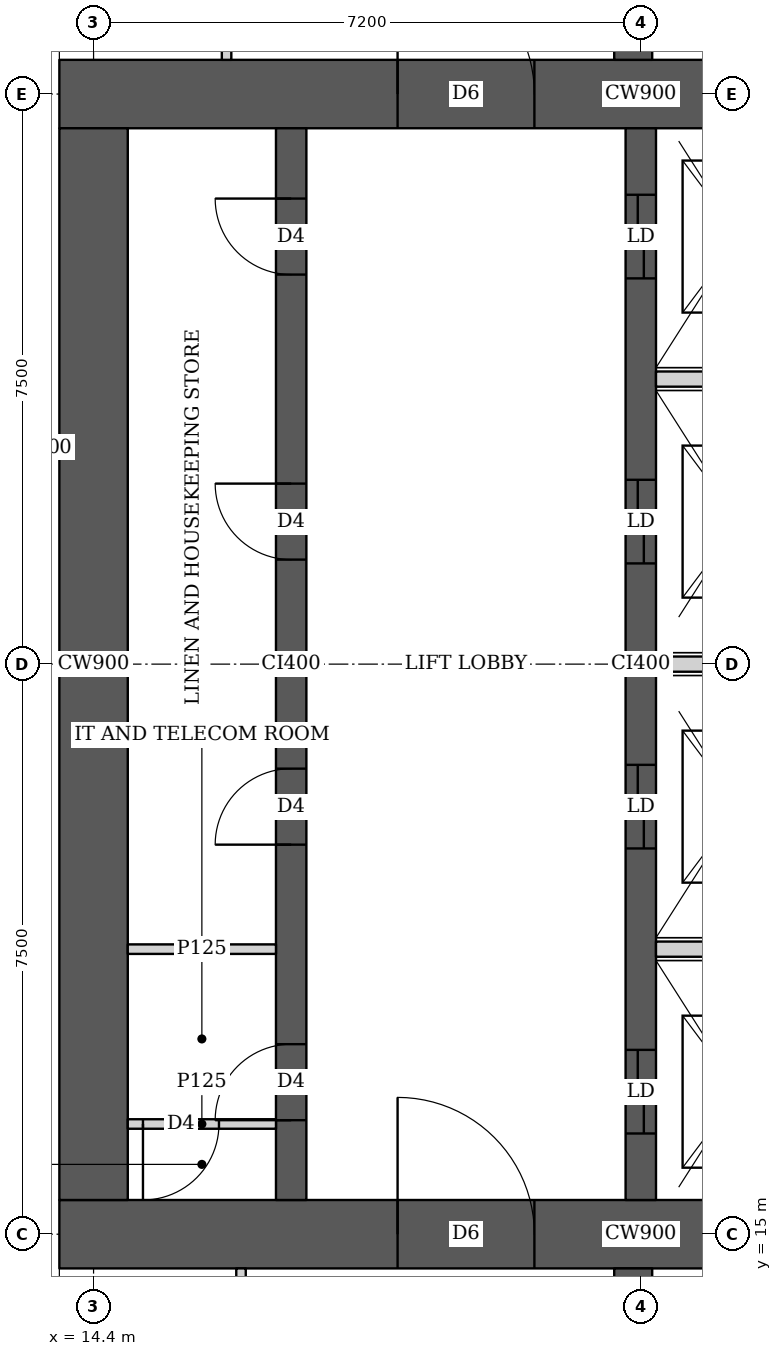
"""IFC4 building model, lengths in metres.
Left out: names, types, materials, properties, quantities, classifications, styles, units other than length and angle.
Written with IfcOpenShell. Run it as: python <this file> out.ifc"""

import sys

from ifc_helpers import new_model, si_unit, direction, frame, frame_2d, origin, place, context, subcontext, project, spatial, rectangle, extrude, element, fill, save


model = new_model("IFC4")
c1 = context("Model", 3, precision=1e-05, world=origin(), true_north=direction((0.0, 1.0)))
c2 = subcontext(c1, "Body", "Model", "MODEL_VIEW")
j1 = project(units=[si_unit("LENGTHUNIT", "METRE"), si_unit("PLANEANGLEUNIT", "RADIAN")], contexts=[c1])
p1 = place(None, origin())
s1 = spatial("IfcSite", under=j1, at=p1, CompositionType="ELEMENT")
p2 = place(p1, origin())
s2 = spatial("IfcBuilding", under=s1, at=p2, CompositionType="ELEMENT")
p3 = place(p2, frame((0.0, 0.0, 266.6)))
s3 = spatial("IfcBuildingStorey", under=s2, at=p3, CompositionType="ELEMENT", Elevation=266.6)
p4 = place(p3, frame((13.95, 15.0, 0.0), z_axis=(0.0, 0.0, 1.0), x_axis=(1.0, 0.0, 0.0)))
e1 = element("IfcWall", 1, at=p4, inside=s3, PredefinedType="SHEAR", context=c2, shape_type="SweptSolid", body=[
    extrude(rectangle(XDim=15.3, YDim=0.9, at=frame_2d((7.65, 0.0))), origin(), (0.0, 0.0, 1.0), 3.75),
])
p5 = place(p4, frame((4.45, 0.0, 0.0)))
e2 = element("IfcOpeningElement", 2, at=p5, cuts=e1, PredefinedType="OPENING", context=c2, shape_type="SweptSolid", body=[
    extrude(rectangle(XDim=1.8, YDim=2.1, at=frame_2d((0.9, 1.05))), frame((0.0, 0.46, 0.0), z_axis=(0.0, -1.0, 0.0), x_axis=(1.0, 0.0, 0.0)), (0.0, 0.0, 1.0), 0.92),
])
p6 = place(p4, frame((10.7, 0.0, 0.0)))
e3 = element("IfcOpeningElement", 3, at=p6, cuts=e1, PredefinedType="OPENING", context=c2, shape_type="SweptSolid", body=[
    extrude(rectangle(XDim=1.1, YDim=2.1, at=frame_2d((0.55, 1.05))), frame((0.0, 0.46, 0.0), z_axis=(0.0, -1.0, 0.0), x_axis=(1.0, 0.0, 0.0)), (0.0, 0.0, 1.0), 0.92),
])
p7 = place(p3, frame((13.95, 30.0, 0.0), z_axis=(0.0, 0.0, 1.0), x_axis=(1.0, 0.0, 0.0)))
e4 = element("IfcWall", 4, at=p7, inside=s3, PredefinedType="SHEAR", context=c2, shape_type="SweptSolid", body=[
    extrude(rectangle(XDim=15.3, YDim=0.9, at=frame_2d((7.65, 0.0))), origin(), (0.0, 0.0, 1.0), 3.75),
])
p8 = place(p7, frame((4.45, 0.0, 0.0)))
e5 = element("IfcOpeningElement", 5, at=p8, cuts=e4, PredefinedType="OPENING", context=c2, shape_type="SweptSolid", body=[
    extrude(rectangle(XDim=1.8, YDim=2.1, at=frame_2d((0.9, 1.05))), frame((0.0, 0.46, 0.0), z_axis=(0.0, -1.0, 0.0), x_axis=(1.0, 0.0, 0.0)), (0.0, 0.0, 1.0), 0.92),
])
p9 = place(p7, frame((10.7, 0.0, 0.0)))
e6 = element("IfcOpeningElement", 6, at=p9, cuts=e4, PredefinedType="OPENING", context=c2, shape_type="SweptSolid", body=[
    extrude(rectangle(XDim=1.1, YDim=2.1, at=frame_2d((0.55, 1.05))), frame((0.0, 0.46, 0.0), z_axis=(0.0, -1.0, 0.0), x_axis=(1.0, 0.0, 0.0)), (0.0, 0.0, 1.0), 0.92),
])
p10 = place(p3, frame((14.4, 15.45, 0.0), z_axis=(0.0, 0.0, 1.0), x_axis=(0.0, 1.0, 0.0)))
e7 = element("IfcWall", 7, at=p10, inside=s3, PredefinedType="SHEAR", context=c2, shape_type="SweptSolid", body=[
    extrude(rectangle(XDim=14.1, YDim=0.9, at=frame_2d((7.05, 0.0))), origin(), (0.0, 0.0, 1.0), 3.75),
])
p11 = place(p3, frame((17.0, 15.45, 0.0), z_axis=(0.0, 0.0, 1.0), x_axis=(0.0, 1.0, 0.0)))
e8 = element("IfcWall", 8, at=p11, inside=s3, PredefinedType="SHEAR", context=c2, shape_type="SweptSolid", body=[
    extrude(rectangle(XDim=14.1, YDim=0.4, at=frame_2d((7.05, 0.0))), origin(), (0.0, 0.0, 1.0), 3.75),
])
p12 = place(p11, frame((1.05, 0.0, 0.0)))
e9 = element("IfcOpeningElement", 9, at=p12, cuts=e8, PredefinedType="OPENING", context=c2, shape_type="SweptSolid", body=[
    extrude(rectangle(XDim=1.0, YDim=2.1, at=frame_2d((0.5, 1.05))), frame((0.0, 0.21, 0.0), z_axis=(0.0, -1.0, 0.0), x_axis=(1.0, 0.0, 0.0)), (0.0, 0.0, 1.0), 0.42),
])
p13 = place(p11, frame((4.675, 0.0, 0.0)))
e10 = element("IfcOpeningElement", 10, at=p13, cuts=e8, PredefinedType="OPENING", context=c2, shape_type="SweptSolid", body=[
    extrude(rectangle(XDim=1.0, YDim=2.1, at=frame_2d((0.5, 1.05))), frame((0.0, 0.21, 0.0), z_axis=(0.0, -1.0, 0.0), x_axis=(1.0, 0.0, 0.0)), (0.0, 0.0, 1.0), 0.42),
])
p14 = place(p11, frame((8.425, 0.0, 0.0)))
e11 = element("IfcOpeningElement", 11, at=p14, cuts=e8, PredefinedType="OPENING", context=c2, shape_type="SweptSolid", body=[
    extrude(rectangle(XDim=1.0, YDim=2.1, at=frame_2d((0.5, 1.05))), frame((0.0, 0.21, 0.0), z_axis=(0.0, -1.0, 0.0), x_axis=(1.0, 0.0, 0.0)), (0.0, 0.0, 1.0), 0.42),
])
p15 = place(p11, frame((12.175, 0.0, 0.0)))
e12 = element("IfcOpeningElement", 12, at=p15, cuts=e8, PredefinedType="OPENING", context=c2, shape_type="SweptSolid", body=[
    extrude(rectangle(XDim=1.0, YDim=2.1, at=frame_2d((0.5, 1.05))), frame((0.0, 0.21, 0.0), z_axis=(0.0, -1.0, 0.0), x_axis=(1.0, 0.0, 0.0)), (0.0, 0.0, 1.0), 0.42),
])
p16 = place(p3, frame((21.6, 15.45, 0.0), z_axis=(0.0, 0.0, 1.0), x_axis=(0.0, 1.0, 0.0)))
e13 = element("IfcWall", 13, at=p16, inside=s3, PredefinedType="SHEAR", context=c2, shape_type="SweptSolid", body=[
    extrude(rectangle(XDim=14.1, YDim=0.4, at=frame_2d((7.05, 0.0))), origin(), (0.0, 0.0, 1.0), 3.75),
])
p17 = place(p16, frame((0.875, 0.0, 0.0)))
e14 = element("IfcOpeningElement", 14, at=p17, cuts=e13, PredefinedType="OPENING", context=c2, shape_type="SweptSolid", body=[
    extrude(rectangle(XDim=1.1, YDim=2.1, at=frame_2d((0.55, 1.05))), frame((0.0, 0.21, 0.0), z_axis=(0.0, -1.0, 0.0), x_axis=(1.0, 0.0, 0.0)), (0.0, 0.0, 1.0), 0.42),
])
p18 = place(p16, frame((4.625, 0.0, 0.0)))
e15 = element("IfcOpeningElement", 15, at=p18, cuts=e13, PredefinedType="OPENING", context=c2, shape_type="SweptSolid", body=[
    extrude(rectangle(XDim=1.1, YDim=2.1, at=frame_2d((0.55, 1.05))), frame((0.0, 0.21, 0.0), z_axis=(0.0, -1.0, 0.0), x_axis=(1.0, 0.0, 0.0)), (0.0, 0.0, 1.0), 0.42),
])
p19 = place(p16, frame((8.375, 0.0, 0.0)))
e16 = element("IfcOpeningElement", 16, at=p19, cuts=e13, PredefinedType="OPENING", context=c2, shape_type="SweptSolid", body=[
    extrude(rectangle(XDim=1.1, YDim=2.1, at=frame_2d((0.55, 1.05))), frame((0.0, 0.21, 0.0), z_axis=(0.0, -1.0, 0.0), x_axis=(1.0, 0.0, 0.0)), (0.0, 0.0, 1.0), 0.42),
])
p20 = place(p16, frame((12.125, 0.0, 0.0)))
e17 = element("IfcOpeningElement", 17, at=p20, cuts=e13, PredefinedType="OPENING", context=c2, shape_type="SweptSolid", body=[
    extrude(rectangle(XDim=1.1, YDim=2.1, at=frame_2d((0.55, 1.05))), frame((0.0, 0.21, 0.0), z_axis=(0.0, -1.0, 0.0), x_axis=(1.0, 0.0, 0.0)), (0.0, 0.0, 1.0), 0.42),
])
for number, where, z_axis, x_axis in (
    (18, (21.5, 10.35, 0.0), (0.0, 0.0, 1.0), (0.0, 1.0, 0.0)),
    (19, (21.5, 30.45, 0.0), (0.0, 0.0, 1.0), (0.0, 1.0, 0.0)),
):
    element("IfcWall", number, at=place(p3, frame(where, z_axis=z_axis, x_axis=x_axis)), inside=s3, PredefinedType="SHEAR", context=c2, shape_type="SweptSolid", body=[
        extrude(rectangle(XDim=4.2, YDim=0.5, at=frame_2d((2.1, 0.0))), origin(), (0.0, 0.0, 1.0), 3.75),
    ])
p21 = place(p3, frame((16.34, 10.562, 0.0), z_axis=(0.0, 0.0, 1.0), x_axis=(0.0, 1.0, 0.0)))
e20 = element("IfcWall", 20, at=p21, inside=s3, PredefinedType="PARTITIONING", context=c2, shape_type="SweptSolid", body=[
    extrude(rectangle(XDim=3.988, YDim=0.125, at=frame_2d((1.994, 0.0))), origin(), (0.0, 0.0, 1.0), 3.5),
])
p22 = place(p21, frame((1.438, 0.0, 0.0)))
e21 = element("IfcOpeningElement", 21, at=p22, cuts=e20, PredefinedType="OPENING", context=c2, shape_type="SweptSolid", body=[
    extrude(rectangle(XDim=1.0, YDim=2.1, at=frame_2d((0.5, 1.05))), frame((0.0, 0.073, 0.0), z_axis=(0.0, -1.0, 0.0), x_axis=(1.0, 0.0, 0.0)), (0.0, 0.0, 1.0), 0.145),
])
p23 = place(p3, frame((16.15, 30.45, 0.0), z_axis=(0.0, 0.0, 1.0), x_axis=(0.0, 1.0, 0.0)))
e22 = element("IfcWall", 22, at=p23, inside=s3, PredefinedType="PARTITIONING", context=c2, shape_type="SweptSolid", body=[
    extrude(rectangle(XDim=4.387, YDim=0.125, at=frame_2d((2.193, 0.0))), origin(), (0.0, 0.0, 1.0), 3.5),
])
p24 = place(p23, frame((1.75, 0.0, 0.0)))
e23 = element("IfcOpeningElement", 23, at=p24, cuts=e22, PredefinedType="OPENING", context=c2, shape_type="SweptSolid", body=[
    extrude(rectangle(XDim=1.0, YDim=2.1, at=frame_2d((0.5, 1.05))), frame((0.0, 0.073, 0.0), z_axis=(0.0, -1.0, 0.0), x_axis=(1.0, 0.0, 0.0)), (0.0, 0.0, 1.0), 0.145),
])
p25 = place(p3, frame((14.85, 16.45, 0.0), z_axis=(0.0, 0.0, 1.0), x_axis=(1.0, 0.0, 0.0)))
e24 = element("IfcWall", 24, at=p25, inside=s3, PredefinedType="PARTITIONING", context=c2, shape_type="SweptSolid", body=[
    extrude(rectangle(XDim=1.95, YDim=0.125, at=frame_2d((0.975, 0.0))), origin(), (0.0, 0.0, 1.0), 3.5),
])
p26 = place(p25, frame((0.2, 0.0, 0.0)))
e25 = element("IfcOpeningElement", 25, at=p26, cuts=e24, PredefinedType="OPENING", context=c2, shape_type="SweptSolid", body=[
    extrude(rectangle(XDim=1.0, YDim=2.1, at=frame_2d((0.5, 1.05))), frame((0.0, 0.073, 0.0), z_axis=(0.0, -1.0, 0.0), x_axis=(1.0, 0.0, 0.0)), (0.0, 0.0, 1.0), 0.145),
])
p27 = place(p3, frame((14.85, 18.75, 0.0), z_axis=(0.0, 0.0, 1.0), x_axis=(1.0, 0.0, 0.0)))
e26 = element("IfcWall", 26, at=p27, inside=s3, PredefinedType="PARTITIONING", context=c2, shape_type="SweptSolid", body=[
    extrude(rectangle(XDim=1.95, YDim=0.125, at=frame_2d((0.975, 0.0))), origin(), (0.0, 0.0, 1.0), 3.5),
])
for number, where, z_axis, x_axis in (
    (27, (21.8, 18.75, 0.0), (0.0, 0.0, 1.0), (1.0, 0.0, 0.0)),
    (28, (21.8, 22.5, 0.0), (0.0, 0.0, 1.0), (1.0, 0.0, 0.0)),
    (29, (21.8, 26.25, 0.0), (0.0, 0.0, 1.0), (1.0, 0.0, 0.0)),
):
    element("IfcWall", number, at=place(p3, frame(where, z_axis=z_axis, x_axis=x_axis)), inside=s3, PredefinedType="SOLIDWALL", context=c2, shape_type="SweptSolid", body=[
        extrude(rectangle(XDim=2.2, YDim=0.2, at=frame_2d((1.1, 0.0))), origin(), (0.0, 0.0, 1.0), 3.5),
    ])
p28 = place(p26, origin())
e30 = element("IfcDoor", 30, at=p28, inside=s3, OperationType="SINGLE_SWING_RIGHT", PredefinedType="DOOR", context=c2, shape_type="SweptSolid", body=[
    extrude(rectangle(XDim=1.0, YDim=2.1, at=frame_2d((0.5, 1.05))), frame((0.0, 0.025, 0.0), z_axis=(0.0, -1.0, 0.0), x_axis=(1.0, 0.0, 0.0)), (0.0, 0.0, 1.0), 0.05),
])
fill(e25, e30)
p29 = place(p12, origin())
e31 = element("IfcDoor", 31, at=p29, inside=s3, OperationType="SINGLE_SWING_LEFT", PredefinedType="DOOR", context=c2, shape_type="SweptSolid", body=[
    extrude(rectangle(XDim=1.0, YDim=2.1, at=frame_2d((0.5, 1.05))), frame((0.0, 0.025, 0.0), z_axis=(0.0, -1.0, 0.0), x_axis=(1.0, 0.0, 0.0)), (0.0, 0.0, 1.0), 0.05),
])
fill(e9, e31)
p30 = place(p13, origin())
e32 = element("IfcDoor", 32, at=p30, inside=s3, OperationType="SINGLE_SWING_LEFT", PredefinedType="DOOR", context=c2, shape_type="SweptSolid", body=[
    extrude(rectangle(XDim=1.0, YDim=2.1, at=frame_2d((0.5, 1.05))), frame((0.0, 0.025, 0.0), z_axis=(0.0, -1.0, 0.0), x_axis=(1.0, 0.0, 0.0)), (0.0, 0.0, 1.0), 0.05),
])
fill(e10, e32)
p31 = place(p14, origin())
e33 = element("IfcDoor", 33, at=p31, inside=s3, OperationType="SINGLE_SWING_RIGHT", PredefinedType="DOOR", context=c2, shape_type="SweptSolid", body=[
    extrude(rectangle(XDim=1.0, YDim=2.1, at=frame_2d((0.5, 1.05))), frame((0.0, 0.025, 0.0), z_axis=(0.0, -1.0, 0.0), x_axis=(1.0, 0.0, 0.0)), (0.0, 0.0, 1.0), 0.05),
])
fill(e11, e33)
p32 = place(p15, origin())
e34 = element("IfcDoor", 34, at=p32, inside=s3, OperationType="SINGLE_SWING_RIGHT", PredefinedType="DOOR", context=c2, shape_type="SweptSolid", body=[
    extrude(rectangle(XDim=1.0, YDim=2.1, at=frame_2d((0.5, 1.05))), frame((0.0, 0.025, 0.0), z_axis=(0.0, -1.0, 0.0), x_axis=(1.0, 0.0, 0.0)), (0.0, 0.0, 1.0), 0.05),
])
fill(e12, e34)
p33 = place(p5, origin())
e35 = element("IfcDoor", 35, at=p33, inside=s3, OperationType="DOUBLE_DOOR_SINGLE_SWING", PredefinedType="DOOR", context=c2, shape_type="SweptSolid", body=[
    extrude(rectangle(XDim=1.8, YDim=2.1, at=frame_2d((0.9, 1.05))), frame((0.0, 0.025, 0.0), z_axis=(0.0, -1.0, 0.0), x_axis=(1.0, 0.0, 0.0)), (0.0, 0.0, 1.0), 0.05),
])
fill(e2, e35)
p34 = place(p8, origin())
e36 = element("IfcDoor", 36, at=p34, inside=s3, OperationType="DOUBLE_DOOR_SINGLE_SWING", PredefinedType="DOOR", context=c2, shape_type="SweptSolid", body=[
    extrude(rectangle(XDim=1.8, YDim=2.1, at=frame_2d((0.9, 1.05))), frame((0.0, 0.025, 0.0), z_axis=(0.0, -1.0, 0.0), x_axis=(1.0, 0.0, 0.0)), (0.0, 0.0, 1.0), 0.05),
])
fill(e5, e36)
p35 = place(p17, origin())
e37 = element("IfcDoor", 37, at=p35, inside=s3, OperationType="DOUBLE_DOOR_SLIDING", PredefinedType="DOOR", context=c2, shape_type="SweptSolid", body=[
    extrude(rectangle(XDim=1.1, YDim=2.1, at=frame_2d((0.55, 1.05))), frame((0.0, 0.025, 0.0), z_axis=(0.0, -1.0, 0.0), x_axis=(1.0, 0.0, 0.0)), (0.0, 0.0, 1.0), 0.05),
])
fill(e14, e37)
p36 = place(p18, origin())
e38 = element("IfcDoor", 38, at=p36, inside=s3, OperationType="DOUBLE_DOOR_SLIDING", PredefinedType="DOOR", context=c2, shape_type="SweptSolid", body=[
    extrude(rectangle(XDim=1.1, YDim=2.1, at=frame_2d((0.55, 1.05))), frame((0.0, 0.025, 0.0), z_axis=(0.0, -1.0, 0.0), x_axis=(1.0, 0.0, 0.0)), (0.0, 0.0, 1.0), 0.05),
])
fill(e15, e38)
p37 = place(p19, origin())
e39 = element("IfcDoor", 39, at=p37, inside=s3, OperationType="DOUBLE_DOOR_SLIDING", PredefinedType="DOOR", context=c2, shape_type="SweptSolid", body=[
    extrude(rectangle(XDim=1.1, YDim=2.1, at=frame_2d((0.55, 1.05))), frame((0.0, 0.025, 0.0), z_axis=(0.0, -1.0, 0.0), x_axis=(1.0, 0.0, 0.0)), (0.0, 0.0, 1.0), 0.05),
])
fill(e16, e39)
p38 = place(p20, origin())
e40 = element("IfcDoor", 40, at=p38, inside=s3, OperationType="DOUBLE_DOOR_SLIDING", PredefinedType="DOOR", context=c2, shape_type="SweptSolid", body=[
    extrude(rectangle(XDim=1.1, YDim=2.1, at=frame_2d((0.55, 1.05))), frame((0.0, 0.025, 0.0), z_axis=(0.0, -1.0, 0.0), x_axis=(1.0, 0.0, 0.0)), (0.0, 0.0, 1.0), 0.05),
])
fill(e17, e40)
save(model, sys.argv[1])
